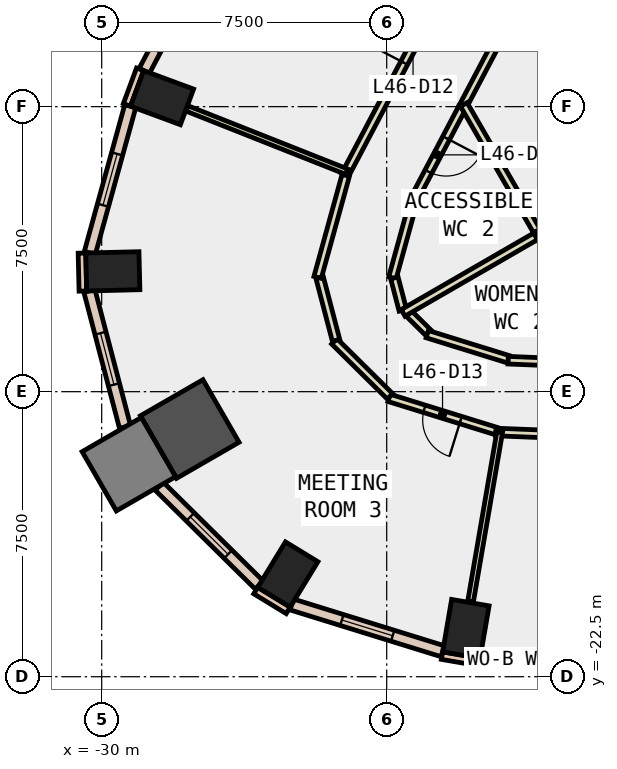
"""IFC4 building model, lengths in metres.
Left out: names, types, materials, properties, quantities, classifications, styles, units other than length and angle.
Written with IfcOpenShell. Run it as: python <this file> out.ifc"""

import sys

from ifc_helpers import new_model, si_unit, direction, frame, frame_2d, origin, origin_2d, place, context, subcontext, project, spatial, rectangle, extrude, element, fill, save


model = new_model("IFC4")
c1 = context("Model", 3, precision=1e-05, world=origin(), true_north=direction((0.0, 1.0)))
c2 = subcontext(c1, "Body", "Model", "MODEL_VIEW")
j1 = project(units=[si_unit("LENGTHUNIT", "METRE"), si_unit("PLANEANGLEUNIT", "RADIAN")], contexts=[c1])
p1 = place(None, origin())
s1 = spatial("IfcSite", under=j1, at=p1, CompositionType="ELEMENT")
p2 = place(p1, origin())
s2 = spatial("IfcBuilding", under=s1, at=p2, CompositionType="ELEMENT")
p3 = place(p2, frame((0.0, 0.0, 206.6)))
s3 = spatial("IfcBuildingStorey", under=s2, at=p3, CompositionType="ELEMENT", Elevation=206.6)
for number, where, z_axis, x_axis in (
    (1, (-20.417, -21.241, -0.4), (0.0, 0.0, 1.0), (-0.986, 0.169, 0.0)),
    (2, (-28.412, -7.264, -0.4), (0.0, 0.0, 1.0), (0.347, 0.938, 0.0)),
    (3, (-29.707, -11.834, -0.4), (0.0, 0.0, 1.0), (-0.025, 1.0, 0.0)),
):
    element("IfcColumn", number, at=place(p3, frame(where, z_axis=z_axis, x_axis=x_axis)), inside=s3, PredefinedType="COLUMN", context=c2, shape_type="SweptSolid", body=[
        extrude(rectangle(XDim=1.0, YDim=1.4, at=origin_2d()), origin(), (0.0, 0.0, 1.0), 4.2),
    ])
p4 = place(p3, frame((-27.683, -15.983, -0.4), z_axis=(0.0, 0.0, 1.0), x_axis=(0.866025403784, 0.5, 0.0)))
e4 = element("IfcColumn", 4, at=p4, inside=s3, PredefinedType="COLUMN", context=c2, shape_type="SweptSolid", body=[
    extrude(rectangle(XDim=1.9, YDim=1.9, at=origin_2d()), origin(), (0.0, 0.0, 1.0), 4.2),
])
p5 = place(p3, frame((-25.102, -19.811, -0.4), z_axis=(0.0, 0.0, 1.0), x_axis=(-0.853423465127, 0.521218178089, 0.0)))
e5 = element("IfcColumn", 5, at=p5, inside=s3, PredefinedType="COLUMN", context=c2, shape_type="SweptSolid", body=[
    extrude(rectangle(XDim=1.0, YDim=1.4, at=origin_2d()), origin(), (0.0, 0.0, 1.0), 4.2),
])
p6 = place(p3, frame((-29.285, -16.908, -0.4), z_axis=(0.0, 0.0, 1.0), x_axis=(0.866025403784, 0.5, 0.0)))
e6 = element("IfcColumn", 6, at=p6, inside=s3, PredefinedType="COLUMN", context=c2, shape_type="SweptSolid", body=[
    extrude(rectangle(XDim=1.8, YDim=1.8, at=origin_2d()), origin(), (0.0, 0.0, 1.0), 4.2),
])
p7 = place(p3, frame((-28.989, -6.518, 0.0), z_axis=(0.0, 0.0, 1.0), x_axis=(-0.346892928577, -0.937904737222, 0.0)))
e7 = element("IfcWall", 7, at=p7, inside=s3, PredefinedType="STANDARD", context=c2, shape_type="SweptSolid", body=[
    extrude(rectangle(XDim=1.0, YDim=0.2, at=frame_2d((0.5, 0.0))), origin(), (0.0, 0.0, 1.0), 3.8),
])
p8 = place(p3, frame((-21.045, -21.945, 0.0), z_axis=(0.0, 0.0, 1.0), x_axis=(0.985631544579, -0.168909615862, 0.0)))
e8 = element("IfcWall", 8, at=p8, inside=s3, PredefinedType="STANDARD", context=c2, shape_type="SweptSolid", body=[
    extrude(rectangle(XDim=1.0, YDim=0.2, at=frame_2d((0.5, 0.0))), origin(), (0.0, 0.0, 1.0), 3.8),
])
p9 = place(p3, frame((-30.519, -11.354, 0.0), z_axis=(0.0, 0.0, 1.0), x_axis=(0.023942303888, -0.999713341956, 0.0)))
e9 = element("IfcWall", 9, at=p9, inside=s3, PredefinedType="STANDARD", context=c2, shape_type="SweptSolid", body=[
    extrude(rectangle(XDim=0.999, YDim=0.2, at=frame_2d((0.5, 0.0))), origin(), (0.0, 0.0, 1.0), 3.8),
])
p10 = place(p3, frame((-25.946, -20.233, 0.0), z_axis=(0.0, 0.0, 1.0), x_axis=(0.853679739553, -0.520798331677, 0.0)))
e10 = element("IfcWall", 10, at=p10, inside=s3, PredefinedType="STANDARD", context=c2, shape_type="SweptSolid", body=[
    extrude(rectangle(XDim=1.0, YDim=0.2, at=frame_2d((0.5, 0.0))), origin(), (0.0, 0.0, 1.0), 3.8),
])
p11 = place(p3, frame((-20.04, -21.999, 0.0), z_axis=(0.0, 0.0, 1.0), x_axis=(0.999205241612, -0.039860822062, 0.0)))
e11 = element("IfcWall", 11, at=p11, inside=s3, PredefinedType="STANDARD", context=c2, shape_type="SweptSolid", body=[
    extrude(rectangle(XDim=5.365, YDim=0.3, at=frame_2d((2.683, 0.0))), origin(), (0.0, 0.0, 1.0), 3.8),
])
p12 = place(p11, frame((0.641, 0.0, 0.9)))
e12 = element("IfcOpeningElement", 12, at=p12, cuts=e11, PredefinedType="OPENING", context=c2, shape_type="SweptSolid", body=[
    extrude(rectangle(XDim=1.4, YDim=2.6, at=frame_2d((0.7, 1.3))), frame((0.0, 0.16, 0.0), z_axis=(0.0, -1.0, 0.0), x_axis=(1.0, 0.0, 0.0)), (0.0, 0.0, 1.0), 0.32),
])
p13 = place(p11, frame((3.324, 0.0, 0.9)))
e13 = element("IfcOpeningElement", 13, at=p13, cuts=e11, PredefinedType="OPENING", context=c2, shape_type="SweptSolid", body=[
    extrude(rectangle(XDim=1.4, YDim=2.6, at=frame_2d((0.7, 1.3))), frame((0.0, 0.16, 0.0), z_axis=(0.0, -1.0, 0.0), x_axis=(1.0, 0.0, 0.0)), (0.0, 0.0, 1.0), 0.32),
])
p14 = place(p3, frame((-25.484, -0.127, 0.0), z_axis=(0.0, 0.0, 1.0), x_axis=(-0.466789249342, -0.884368586449, 0.0)))
e14 = element("IfcWall", 14, at=p14, inside=s3, PredefinedType="STANDARD", context=c2, shape_type="SweptSolid", body=[
    extrude(rectangle(XDim=7.273, YDim=0.3, at=frame_2d((3.637, 0.0))), origin(), (0.0, 0.0, 1.0), 3.8),
])
p15 = place(p14, frame((0.618, 0.0, 0.9)))
e15 = element("IfcOpeningElement", 15, at=p15, cuts=e14, PredefinedType="OPENING", context=c2, shape_type="SweptSolid", body=[
    extrude(rectangle(XDim=2.4, YDim=2.6, at=frame_2d((1.2, 1.3))), frame((0.0, 0.16, 0.0), z_axis=(0.0, -1.0, 0.0), x_axis=(1.0, 0.0, 0.0)), (0.0, 0.0, 1.0), 0.32),
])
p16 = place(p14, frame((4.255, 0.0, 0.9)))
e16 = element("IfcOpeningElement", 16, at=p16, cuts=e14, PredefinedType="OPENING", context=c2, shape_type="SweptSolid", body=[
    extrude(rectangle(XDim=2.4, YDim=2.6, at=frame_2d((1.2, 1.3))), frame((0.0, 0.16, 0.0), z_axis=(0.0, -1.0, 0.0), x_axis=(1.0, 0.0, 0.0)), (0.0, 0.0, 1.0), 0.32),
])
p17 = place(p3, frame((-29.248, -7.487, 0.0), z_axis=(0.0, 0.0, 1.0), x_axis=(-0.265534577923, -0.96410133696, 0.0)))
e17 = element("IfcWall", 17, at=p17, inside=s3, PredefinedType="STANDARD", context=c2, shape_type="SweptSolid", body=[
    extrude(rectangle(XDim=4.007, YDim=0.3, at=frame_2d((2.003, 0.0))), origin(), (0.0, 0.0, 1.0), 3.8),
])
p18 = place(p17, frame((1.303, 0.0, 0.9)))
e18 = element("IfcOpeningElement", 18, at=p18, cuts=e17, PredefinedType="OPENING", context=c2, shape_type="SweptSolid", body=[
    extrude(rectangle(XDim=1.4, YDim=2.6, at=frame_2d((0.7, 1.3))), frame((0.0, 0.16, 0.0), z_axis=(0.0, -1.0, 0.0), x_axis=(1.0, 0.0, 0.0)), (0.0, 0.0, 1.0), 0.32),
])
p19 = place(p3, frame((-30.323, -12.348, 0.0), z_axis=(0.0, 0.0, 1.0), x_axis=(0.253200635583, -0.96741378848, 0.0)))
e19 = element("IfcWall", 19, at=p19, inside=s3, PredefinedType="STANDARD", context=c2, shape_type="SweptSolid", body=[
    extrude(rectangle(XDim=3.701, YDim=0.3, at=frame_2d((1.85, 0.0))), origin(), (0.0, 0.0, 1.0), 3.8),
])
p20 = place(p19, frame((1.15, 0.0, 0.9)))
e20 = element("IfcOpeningElement", 20, at=p20, cuts=e19, PredefinedType="OPENING", context=c2, shape_type="SweptSolid", body=[
    extrude(rectangle(XDim=1.4, YDim=2.6, at=frame_2d((0.7, 1.3))), frame((0.0, 0.16, 0.0), z_axis=(0.0, -1.0, 0.0), x_axis=(1.0, 0.0, 0.0)), (0.0, 0.0, 1.0), 0.32),
])
p21 = place(p3, frame((-28.487, -17.486, 0.0), z_axis=(0.0, 0.0, 1.0), x_axis=(0.711316812334, -0.702871533419, 0.0)))
e21 = element("IfcWall", 21, at=p21, inside=s3, PredefinedType="STANDARD", context=c2, shape_type="SweptSolid", body=[
    extrude(rectangle(XDim=3.7, YDim=0.3, at=frame_2d((1.85, 0.0))), origin(), (0.0, 0.0, 1.0), 3.8),
])
p22 = place(p21, frame((1.15, 0.0, 0.9)))
e22 = element("IfcOpeningElement", 22, at=p22, cuts=e21, PredefinedType="OPENING", context=c2, shape_type="SweptSolid", body=[
    extrude(rectangle(XDim=1.4, YDim=2.6, at=frame_2d((0.7, 1.3))), frame((0.0, 0.16, 0.0), z_axis=(0.0, -1.0, 0.0), x_axis=(1.0, 0.0, 0.0)), (0.0, 0.0, 1.0), 0.32),
])
p23 = place(p3, frame((-24.999, -20.599, 0.0), z_axis=(0.0, 0.0, 1.0), x_axis=(0.955247215067, -0.295808651171, 0.0)))
e23 = element("IfcWall", 23, at=p23, inside=s3, PredefinedType="STANDARD", context=c2, shape_type="SweptSolid", body=[
    extrude(rectangle(XDim=4.161, YDim=0.3, at=frame_2d((2.081, 0.0))), origin(), (0.0, 0.0, 1.0), 3.8),
])
p24 = place(p23, frame((1.381, 0.0, 0.9)))
e24 = element("IfcOpeningElement", 24, at=p24, cuts=e23, PredefinedType="OPENING", context=c2, shape_type="SweptSolid", body=[
    extrude(rectangle(XDim=1.4, YDim=2.6, at=frame_2d((0.7, 1.3))), frame((0.0, 0.16, 0.0), z_axis=(0.0, -1.0, 0.0), x_axis=(1.0, 0.0, 0.0)), (0.0, 0.0, 1.0), 0.32),
])
p25 = place(p3, frame((-18.344, -3.417, 0.0), z_axis=(0.0, 0.0, 1.0), x_axis=(-0.466889669343, -0.884315575267, 0.0)))
e25 = element("IfcWall", 25, at=p25, inside=s3, PredefinedType="PARTITIONING", context=c2, shape_type="SweptSolid", body=[
    extrude(rectangle(XDim=4.654, YDim=0.2, at=frame_2d((2.327, 0.0))), origin(), (0.0, 0.0, 1.0), 3.8),
])
p26 = place(p25, frame((1.827, 0.0, 0.0)))
e26 = element("IfcOpeningElement", 26, at=p26, cuts=e25, PredefinedType="OPENING", context=c2, shape_type="SweptSolid", body=[
    extrude(rectangle(XDim=1.0, YDim=2.1, at=frame_2d((0.5, 1.05))), frame((0.0, 0.11, 0.0), z_axis=(0.0, -1.0, 0.0), x_axis=(1.0, 0.0, 0.0)), (0.0, 0.0, 1.0), 0.22),
])
p27 = place(p3, frame((-20.517, -7.533, 0.0), z_axis=(0.0, 0.0, 1.0), x_axis=(-0.466570716246, -0.88448389852, 0.0)))
e27 = element("IfcWall", 27, at=p27, inside=s3, PredefinedType="PARTITIONING", context=c2, shape_type="SweptSolid", body=[
    extrude(rectangle(XDim=2.795, YDim=0.2, at=frame_2d((1.397, 0.0))), origin(), (0.0, 0.0, 1.0), 3.8),
])
p28 = place(p27, frame((0.897, 0.0, 0.0)))
e28 = element("IfcOpeningElement", 28, at=p28, cuts=e27, PredefinedType="OPENING", context=c2, shape_type="SweptSolid", body=[
    extrude(rectangle(XDim=1.0, YDim=2.1, at=frame_2d((0.5, 1.05))), frame((0.0, 0.11, 0.0), z_axis=(0.0, -1.0, 0.0), x_axis=(1.0, 0.0, 0.0)), (0.0, 0.0, 1.0), 0.22),
])
p29 = place(p3, frame((-21.801, -10.013, 0.0), z_axis=(0.0, 0.0, 1.0), x_axis=(-0.265584627827, -0.964087550725, 0.0)))
e29 = element("IfcWall", 29, at=p29, inside=s3, PredefinedType="PARTITIONING", context=c2, shape_type="SweptSolid", body=[
    extrude(rectangle(XDim=2.067, YDim=0.2, at=frame_2d((1.034, 0.0))), origin(), (0.0, 0.0, 1.0), 3.8),
])
p30 = place(p3, frame((-22.298, -12.006, 0.0), z_axis=(0.0, 0.0, 1.0), x_axis=(0.252647929446, -0.967558279251, 0.0)))
e30 = element("IfcWall", 30, at=p30, inside=s3, PredefinedType="PARTITIONING", context=c2, shape_type="SweptSolid", body=[
    extrude(rectangle(XDim=0.879, YDim=0.2, at=frame_2d((0.44, 0.0))), origin(), (0.0, 0.0, 1.0), 3.8),
])
p31 = place(p3, frame((-21.912, -12.948, 0.0), z_axis=(0.0, 0.0, 1.0), x_axis=(0.712089244685, -0.702088959893, 0.0)))
e31 = element("IfcWall", 31, at=p31, inside=s3, PredefinedType="PARTITIONING", context=c2, shape_type="SweptSolid", body=[
    extrude(rectangle(XDim=0.708, YDim=0.2, at=frame_2d((0.354, 0.0))), origin(), (0.0, 0.0, 1.0), 3.8),
])
p32 = place(p3, frame((-21.433, -13.486, 0.0), z_axis=(0.0, 0.0, 1.0), x_axis=(0.955241047187, -0.295828568211, 0.0)))
e32 = element("IfcWall", 32, at=p32, inside=s3, PredefinedType="PARTITIONING", context=c2, shape_type="SweptSolid", body=[
    extrude(rectangle(XDim=2.234, YDim=0.2, at=frame_2d((1.117, 0.0))), origin(), (0.0, 0.0, 1.0), 3.8),
])
p33 = place(p3, frame((-19.303, -14.172, 0.0), z_axis=(0.0, 0.0, 1.0), x_axis=(0.999205458466, -0.03985538574, 0.0)))
e33 = element("IfcWall", 33, at=p33, inside=s3, PredefinedType="PARTITIONING", context=c2, shape_type="SweptSolid", body=[
    extrude(rectangle(XDim=2.683, YDim=0.2, at=frame_2d((1.342, 0.0))), origin(), (0.0, 0.0, 1.0), 3.8),
])
p34 = place(p33, frame((0.842, 0.0, 0.0)))
e34 = element("IfcOpeningElement", 34, at=p34, cuts=e33, PredefinedType="OPENING", context=c2, shape_type="SweptSolid", body=[
    extrude(rectangle(XDim=1.0, YDim=2.1, at=frame_2d((0.5, 1.05))), frame((0.0, 0.11, 0.0), z_axis=(0.0, -1.0, 0.0), x_axis=(1.0, 0.0, 0.0)), (0.0, 0.0, 1.0), 0.22),
])
p35 = place(p3, frame((-23.598, -9.301, 0.0), z_axis=(0.0, 0.0, 1.0), x_axis=(0.466852608943, 0.884335140952, 0.0)))
e35 = element("IfcWall", 35, at=p35, inside=s3, PredefinedType="PARTITIONING", context=c2, shape_type="SweptSolid", body=[
    extrude(rectangle(XDim=7.675, YDim=0.2, at=frame_2d((3.837, 0.0))), origin(), (0.0, 0.0, 1.0), 3.8),
])
p36 = place(p35, frame((3.337, 0.0, 0.0)))
e36 = element("IfcOpeningElement", 36, at=p36, cuts=e35, PredefinedType="OPENING", context=c2, shape_type="SweptSolid", body=[
    extrude(rectangle(XDim=1.0, YDim=2.1, at=frame_2d((0.5, 1.05))), frame((0.0, 0.11, 0.0), z_axis=(0.0, -1.0, 0.0), x_axis=(1.0, 0.0, 0.0)), (0.0, 0.0, 1.0), 0.22),
])
p37 = place(p3, frame((-19.623, -16.035, 0.0), z_axis=(0.0, 0.0, 1.0), x_axis=(-0.955234616163, 0.295849333419, 0.0)))
e37 = element("IfcWall", 37, at=p37, inside=s3, PredefinedType="PARTITIONING", context=c2, shape_type="SweptSolid", body=[
    extrude(rectangle(XDim=2.947, YDim=0.2, at=frame_2d((1.473, 0.0))), origin(), (0.0, 0.0, 1.0), 3.8),
])
p38 = place(p37, frame((0.974, 0.0, 0.0)))
e38 = element("IfcOpeningElement", 38, at=p38, cuts=e37, PredefinedType="OPENING", context=c2, shape_type="SweptSolid", body=[
    extrude(rectangle(XDim=1.0, YDim=2.1, at=frame_2d((0.5, 1.05))), frame((0.0, 0.11, 0.0), z_axis=(0.0, -1.0, 0.0), x_axis=(1.0, 0.0, 0.0)), (0.0, 0.0, 1.0), 0.22),
])
p39 = place(p3, frame((-22.414, -15.123, 0.0), z_axis=(0.0, 0.0, 1.0), x_axis=(-0.710949827962, 0.703242733429, 0.0)))
e39 = element("IfcWall", 39, at=p39, inside=s3, PredefinedType="PARTITIONING", context=c2, shape_type="SweptSolid", body=[
    extrude(rectangle(XDim=2.059, YDim=0.2, at=frame_2d((1.03, 0.0))), origin(), (0.0, 0.0, 1.0), 3.8),
])
p40 = place(p3, frame((-23.833, -13.649, 0.0), z_axis=(0.0, 0.0, 1.0), x_axis=(-0.253025690571, 0.967459559832, 0.0)))
e40 = element("IfcWall", 40, at=p40, inside=s3, PredefinedType="PARTITIONING", context=c2, shape_type="SweptSolid", body=[
    extrude(rectangle(XDim=1.712, YDim=0.2, at=frame_2d((0.856, 0.0))), origin(), (0.0, 0.0, 1.0), 3.8),
])
p41 = place(p3, frame((-24.318, -11.993, 0.0), z_axis=(0.0, 0.0, 1.0), x_axis=(0.265884037198, 0.964005020092, 0.0)))
e41 = element("IfcWall", 41, at=p41, inside=s3, PredefinedType="PARTITIONING", context=c2, shape_type="SweptSolid", body=[
    extrude(rectangle(XDim=2.784, YDim=0.2, at=frame_2d((1.392, 0.0))), origin(), (0.0, 0.0, 1.0), 3.8),
])
p42 = place(p3, frame((-13.986, -16.286, 0.0), z_axis=(0.0, 0.0, 1.0), x_axis=(-0.999206475857, 0.039829870775, 0.0)))
e42 = element("IfcWall", 42, at=p42, inside=s3, PredefinedType="PARTITIONING", context=c2, shape_type="SweptSolid", body=[
    extrude(rectangle(XDim=5.645, YDim=0.2, at=frame_2d((2.823, 0.0))), origin(), (0.0, 0.0, 1.0), 3.8),
])
p43 = place(p42, frame((2.323, 0.0, 0.0)))
e43 = element("IfcOpeningElement", 43, at=p43, cuts=e42, PredefinedType="OPENING", context=c2, shape_type="SweptSolid", body=[
    extrude(rectangle(XDim=1.0, YDim=2.1, at=frame_2d((0.5, 1.05))), frame((0.0, 0.11, 0.0), z_axis=(0.0, -1.0, 0.0), x_axis=(1.0, 0.0, 0.0)), (0.0, 0.0, 1.0), 0.22),
])
p44 = place(p3, frame((-16.595, -9.757, 0.0), z_axis=(0.0, 0.0, 1.0), x_axis=(-0.866053019151, -0.499952165731, 0.0)))
e44 = element("IfcWall", 44, at=p44, inside=s3, PredefinedType="PARTITIONING", context=c2, shape_type="SweptSolid", body=[
    extrude(rectangle(XDim=2.3, YDim=0.2, at=frame_2d((1.15, 0.0))), origin(), (0.0, 0.0, 1.0), 3.8),
])
p45 = place(p3, frame((-18.55, -10.77, 0.0), z_axis=(0.0, 0.0, 1.0), x_axis=(-0.500050869834, 0.86599603208, 0.0)))
e45 = element("IfcWall", 45, at=p45, inside=s3, PredefinedType="PARTITIONING", context=c2, shape_type="SweptSolid", body=[
    extrude(rectangle(XDim=3.839, YDim=0.2, at=frame_2d((1.92, 0.0))), origin(), (0.0, 0.0, 1.0), 3.8),
])
p46 = place(p3, frame((-16.472, -14.37, 0.0), z_axis=(0.0, 0.0, 1.0), x_axis=(-0.500009715097, 0.866019794698, 0.0)))
e46 = element("IfcWall", 46, at=p46, inside=s3, PredefinedType="PARTITIONING", context=c2, shape_type="SweptSolid", body=[
    extrude(rectangle(XDim=3.948, YDim=0.2, at=frame_2d((1.974, 0.0))), origin(), (0.0, 0.0, 1.0), 3.8),
])
p47 = place(p3, frame((-18.583, -10.914, 0.0), z_axis=(0.0, 0.0, 1.0), x_axis=(-0.8659987338, -0.500046190923, 0.0)))
e47 = element("IfcWall", 47, at=p47, inside=s3, PredefinedType="PARTITIONING", context=c2, shape_type="SweptSolid", body=[
    extrude(rectangle(XDim=4.025, YDim=0.2, at=frame_2d((2.013, 0.0))), origin(), (0.0, 0.0, 1.0), 3.8),
])
p48 = place(p3, frame((-23.552, -9.212, 0.0), z_axis=(0.0, 0.0, 1.0), x_axis=(-0.929720624715, 0.368265610639, 0.0)))
e48 = element("IfcWall", 48, at=p48, inside=s3, PredefinedType="PARTITIONING", context=c2, shape_type="SweptSolid", body=[
    extrude(rectangle(XDim=4.515, YDim=0.15, at=frame_2d((2.258, 0.0))), origin(), (0.0, 0.0, 1.0), 3.8),
])
p49 = place(p3, frame((-19.527, -16.065, 0.0), z_axis=(0.0, 0.0, 1.0), x_axis=(-0.169437821314, -0.985540879268, 0.0)))
e49 = element("IfcWall", 49, at=p49, inside=s3, PredefinedType="PARTITIONING", context=c2, shape_type="SweptSolid", body=[
    extrude(rectangle(XDim=4.531, YDim=0.15, at=frame_2d((2.266, 0.0))), origin(), (0.0, 0.0, 1.0), 3.8),
])
p50 = place(p12, origin())
e50 = element("IfcWindow", 50, at=p50, inside=s3, PartitioningType="SINGLE_PANEL", PredefinedType="WINDOW", context=c2, shape_type="SweptSolid", body=[
    extrude(rectangle(XDim=1.4, YDim=2.6, at=frame_2d((0.7, 1.3))), frame((0.0, 0.03, 0.0), z_axis=(0.0, -1.0, 0.0), x_axis=(1.0, 0.0, 0.0)), (0.0, 0.0, 1.0), 0.06),
])
fill(e12, e50)
p51 = place(p18, origin())
e51 = element("IfcWindow", 51, at=p51, inside=s3, PartitioningType="SINGLE_PANEL", PredefinedType="WINDOW", context=c2, shape_type="SweptSolid", body=[
    extrude(rectangle(XDim=1.4, YDim=2.6, at=frame_2d((0.7, 1.3))), frame((0.0, 0.03, 0.0), z_axis=(0.0, -1.0, 0.0), x_axis=(1.0, 0.0, 0.0)), (0.0, 0.0, 1.0), 0.06),
])
fill(e18, e51)
p52 = place(p20, origin())
e52 = element("IfcWindow", 52, at=p52, inside=s3, PartitioningType="SINGLE_PANEL", PredefinedType="WINDOW", context=c2, shape_type="SweptSolid", body=[
    extrude(rectangle(XDim=1.4, YDim=2.6, at=frame_2d((0.7, 1.3))), frame((0.0, 0.03, 0.0), z_axis=(0.0, -1.0, 0.0), x_axis=(1.0, 0.0, 0.0)), (0.0, 0.0, 1.0), 0.06),
])
fill(e20, e52)
p53 = place(p22, origin())
e53 = element("IfcWindow", 53, at=p53, inside=s3, PartitioningType="SINGLE_PANEL", PredefinedType="WINDOW", context=c2, shape_type="SweptSolid", body=[
    extrude(rectangle(XDim=1.4, YDim=2.6, at=frame_2d((0.7, 1.3))), frame((0.0, 0.03, 0.0), z_axis=(0.0, -1.0, 0.0), x_axis=(1.0, 0.0, 0.0)), (0.0, 0.0, 1.0), 0.06),
])
fill(e22, e53)
p54 = place(p24, origin())
e54 = element("IfcWindow", 54, at=p54, inside=s3, PartitioningType="SINGLE_PANEL", PredefinedType="WINDOW", context=c2, shape_type="SweptSolid", body=[
    extrude(rectangle(XDim=1.4, YDim=2.6, at=frame_2d((0.7, 1.3))), frame((0.0, 0.03, 0.0), z_axis=(0.0, -1.0, 0.0), x_axis=(1.0, 0.0, 0.0)), (0.0, 0.0, 1.0), 0.06),
])
fill(e24, e54)
p55 = place(p36, origin())
e55 = element("IfcDoor", 55, at=p55, inside=s3, OperationType="SINGLE_SWING_LEFT", PredefinedType="DOOR", context=c2, shape_type="SweptSolid", body=[
    extrude(rectangle(XDim=1.0, YDim=2.1, at=frame_2d((0.5, 1.05))), frame((0.0, 0.025, 0.0), z_axis=(0.0, -1.0, 0.0), x_axis=(1.0, 0.0, 0.0)), (0.0, 0.0, 1.0), 0.05),
])
fill(e36, e55)
p56 = place(p38, origin())
e56 = element("IfcDoor", 56, at=p56, inside=s3, OperationType="SINGLE_SWING_LEFT", PredefinedType="DOOR", context=c2, shape_type="SweptSolid", body=[
    extrude(rectangle(XDim=1.0, YDim=2.1, at=frame_2d((0.5, 1.05))), frame((0.0, 0.025, 0.0), z_axis=(0.0, -1.0, 0.0), x_axis=(1.0, 0.0, 0.0)), (0.0, 0.0, 1.0), 0.05),
])
fill(e38, e56)
p57 = place(p28, origin())
e57 = element("IfcDoor", 57, at=p57, inside=s3, OperationType="SINGLE_SWING_LEFT", PredefinedType="DOOR", context=c2, shape_type="SweptSolid", body=[
    extrude(rectangle(XDim=1.0, YDim=2.1, at=frame_2d((0.5, 1.05))), frame((0.0, 0.025, 0.0), z_axis=(0.0, -1.0, 0.0), x_axis=(1.0, 0.0, 0.0)), (0.0, 0.0, 1.0), 0.05),
])
fill(e28, e57)
save(model, sys.argv[1])
